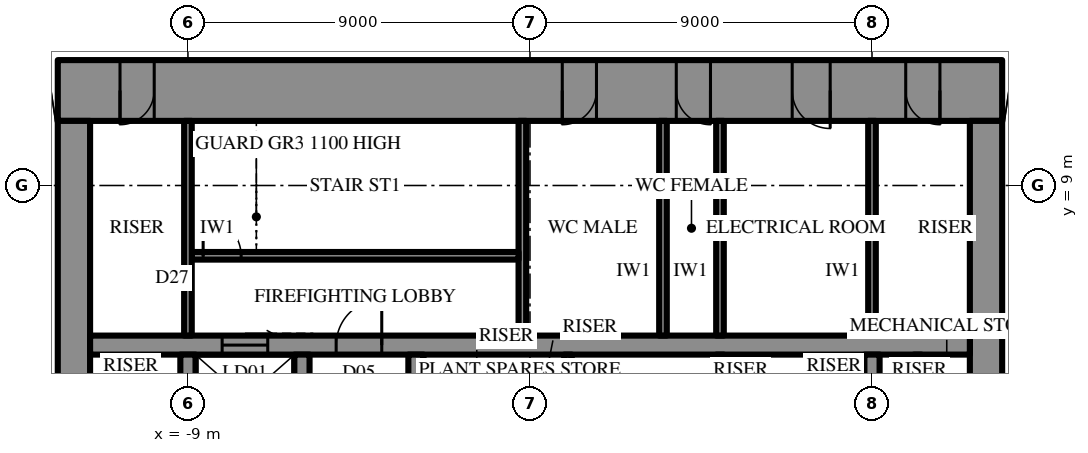
"""IFC4 building model, lengths in metres.
Left out: names, types, materials, properties, quantities, classifications, styles, units other than length and angle.
Written with IfcOpenShell. Run it as: python <this file> out.ifc"""

import sys

from ifc_helpers import new_model, si_unit, direction, frame, frame_2d, origin, place, context, subcontext, project, spatial, rectangle, extrude, element, fill, save


model = new_model("IFC4")
c1 = context("Model", 3, precision=1e-05, world=origin(), true_north=direction((0.0, 1.0)))
c2 = subcontext(c1, "Body", "Model", "MODEL_VIEW")
j1 = project(units=[si_unit("LENGTHUNIT", "METRE"), si_unit("PLANEANGLEUNIT", "RADIAN")], contexts=[c1])
p1 = place(None, origin())
s1 = spatial("IfcSite", under=j1, at=p1, CompositionType="ELEMENT")
p2 = place(p1, origin())
s2 = spatial("IfcBuilding", under=s1, at=p2, CompositionType="ELEMENT")
p3 = place(p2, frame((0.0, 0.0, 402.3)))
s3 = spatial("IfcBuildingStorey", under=s2, at=p3, CompositionType="ELEMENT", Elevation=402.3)
p4 = place(p3, frame((-12.425, 11.5, 0.0), z_axis=(0.0, 0.0, 1.0), x_axis=(1.0, 0.0, 0.0)))
e1 = element("IfcWall", 1, at=p4, inside=s3, PredefinedType="SHEAR", context=c2, shape_type="SweptSolid", body=[
    extrude(rectangle(XDim=24.85, YDim=1.6, at=frame_2d((12.425, 0.0))), origin(), (0.0, 0.0, 1.0), 6.0),
])
p5 = place(p4, frame((13.275, 0.0, 0.0)))
e2 = element("IfcOpeningElement", 2, at=p5, cuts=e1, PredefinedType="OPENING", context=c2, shape_type="SweptSolid", body=[
    extrude(rectangle(XDim=0.9, YDim=2.2, at=frame_2d((0.45, 1.1))), frame((0.0, 0.81, 0.0), z_axis=(0.0, -1.0, 0.0), x_axis=(1.0, 0.0, 0.0)), (0.0, 0.0, 1.0), 1.62),
])
p6 = place(p4, frame((16.275, 0.0, 0.0)))
e3 = element("IfcOpeningElement", 3, at=p6, cuts=e1, PredefinedType="OPENING", context=c2, shape_type="SweptSolid", body=[
    extrude(rectangle(XDim=0.9, YDim=2.2, at=frame_2d((0.45, 1.1))), frame((0.0, 0.81, 0.0), z_axis=(0.0, -1.0, 0.0), x_axis=(1.0, 0.0, 0.0)), (0.0, 0.0, 1.0), 1.62),
])
p7 = place(p4, frame((19.325, 0.0, 0.0)))
e4 = element("IfcOpeningElement", 4, at=p7, cuts=e1, PredefinedType="OPENING", context=c2, shape_type="SweptSolid", body=[
    extrude(rectangle(XDim=1.0, YDim=2.2, at=frame_2d((0.5, 1.1))), frame((0.0, 0.81, 0.0), z_axis=(0.0, -1.0, 0.0), x_axis=(1.0, 0.0, 0.0)), (0.0, 0.0, 1.0), 1.62),
])
p8 = place(p4, frame((1.637, 0.0, 0.0)))
e5 = element("IfcOpeningElement", 5, at=p8, cuts=e1, PredefinedType="OPENING", context=c2, shape_type="SweptSolid", body=[
    extrude(rectangle(XDim=0.9, YDim=2.2, at=frame_2d((0.45, 1.1))), frame((0.0, 0.81, 0.0), z_axis=(0.0, -1.0, 0.0), x_axis=(1.0, 0.0, 0.0)), (0.0, 0.0, 1.0), 1.62),
])
p9 = place(p4, frame((22.312, 0.0, 0.0)))
e6 = element("IfcOpeningElement", 6, at=p9, cuts=e1, PredefinedType="OPENING", context=c2, shape_type="SweptSolid", body=[
    extrude(rectangle(XDim=0.9, YDim=2.2, at=frame_2d((0.45, 1.1))), frame((0.0, 0.81, 0.0), z_axis=(0.0, -1.0, 0.0), x_axis=(1.0, 0.0, 0.0)), (0.0, 0.0, 1.0), 1.62),
])
p10 = place(p3, frame((12.0, -10.7, 0.0), z_axis=(0.0, 0.0, 1.0), x_axis=(0.0, 1.0, 0.0)))
e7 = element("IfcWall", 7, at=p10, inside=s3, PredefinedType="SHEAR", context=c2, shape_type="SweptSolid", body=[
    extrude(rectangle(XDim=21.4, YDim=0.85, at=frame_2d((10.7, 0.0))), origin(), (0.0, 0.0, 1.0), 6.0),
])
p11 = place(p10, frame((9.8, 0.0, 0.0)))
e8 = element("IfcOpeningElement", 8, at=p11, cuts=e7, PredefinedType="OPENING", context=c2, shape_type="SweptSolid", body=[
    extrude(rectangle(XDim=1.8, YDim=2.4, at=frame_2d((0.9, 1.2))), frame((0.0, 0.435, 0.0), z_axis=(0.0, -1.0, 0.0), x_axis=(1.0, 0.0, 0.0)), (0.0, 0.0, 1.0), 0.87),
])
p12 = place(p3, frame((-12.0, 10.7, 0.0), z_axis=(0.0, 0.0, 1.0), x_axis=(0.0, -1.0, 0.0)))
e9 = element("IfcWall", 9, at=p12, inside=s3, PredefinedType="SHEAR", context=c2, shape_type="SweptSolid", body=[
    extrude(rectangle(XDim=21.4, YDim=0.85, at=frame_2d((10.7, 0.0))), origin(), (0.0, 0.0, 1.0), 6.0),
])
p13 = place(p12, frame((9.8, 0.0, 0.0)))
e10 = element("IfcOpeningElement", 10, at=p13, cuts=e9, PredefinedType="OPENING", context=c2, shape_type="SweptSolid", body=[
    extrude(rectangle(XDim=1.8, YDim=2.4, at=frame_2d((0.9, 1.2))), frame((0.0, 0.435, 0.0), z_axis=(0.0, -1.0, 0.0), x_axis=(1.0, 0.0, 0.0)), (0.0, 0.0, 1.0), 0.87),
])
p14 = place(p3, frame((-11.575, 4.8, 0.0), z_axis=(0.0, 0.0, 1.0), x_axis=(1.0, 0.0, 0.0)))
e11 = element("IfcWall", 11, at=p14, inside=s3, PredefinedType="SHEAR", context=c2, shape_type="SweptSolid", body=[
    extrude(rectangle(XDim=23.15, YDim=0.5, at=frame_2d((11.575, 0.0))), origin(), (0.0, 0.0, 1.0), 6.0),
])
p15 = place(p14, frame((6.475, 0.0, 0.0)))
e12 = element("IfcOpeningElement", 12, at=p15, cuts=e11, PredefinedType="OPENING", context=c2, shape_type="SweptSolid", body=[
    extrude(rectangle(XDim=1.2, YDim=2.2, at=frame_2d((0.6, 1.1))), frame((0.0, 0.26, 0.0), z_axis=(0.0, -1.0, 0.0), x_axis=(1.0, 0.0, 0.0)), (0.0, 0.0, 1.0), 0.52),
])
p16 = place(p14, frame((3.475, 0.0, 0.0)))
e13 = element("IfcOpeningElement", 13, at=p16, cuts=e11, PredefinedType="OPENING", context=c2, shape_type="SweptSolid", body=[
    extrude(rectangle(XDim=1.2, YDim=2.2, at=frame_2d((0.6, 1.1))), frame((0.0, 0.26, 0.0), z_axis=(0.0, -1.0, 0.0), x_axis=(1.0, 0.0, 0.0)), (0.0, 0.0, 1.0), 0.52),
])
for number, where, z_axis, x_axis in (
    (14, (-9.0, 2.25, 0.0), (0.0, 0.0, 1.0), (0.0, 1.0, 0.0)),
    (15, (-6.0, 2.25, 0.0), (0.0, 0.0, 1.0), (0.0, 1.0, 0.0)),
    (16, (-3.0, 2.25, 0.0), (0.0, 0.0, 1.0), (0.0, 1.0, 0.0)),
    (17, (9.0, 2.25, 0.0), (0.0, 0.0, 1.0), (0.0, 1.0, 0.0)),
):
    element("IfcWall", number, at=place(p3, frame(where, z_axis=z_axis, x_axis=x_axis)), inside=s3, PredefinedType="SHEAR", context=c2, shape_type="SweptSolid", body=[
        extrude(rectangle(XDim=2.3, YDim=0.4, at=frame_2d((1.15, 0.0))), origin(), (0.0, 0.0, 1.0), 6.0),
    ])
p17 = place(p3, frame((-0.2, 5.05, 0.0), z_axis=(0.0, 0.0, 1.0), x_axis=(0.0, 1.0, 0.0)))
e18 = element("IfcWall", 18, at=p17, inside=s3, PredefinedType="SHEAR", context=c2, shape_type="SweptSolid", body=[
    extrude(rectangle(XDim=5.65, YDim=0.2, at=frame_2d((2.825, 0.0))), origin(), (0.0, 0.0, 1.0), 6.0),
])
p18 = place(p3, frame((-8.9, 7.15, 0.0), z_axis=(0.0, 0.0, 1.0), x_axis=(1.0, 0.0, 0.0)))
e19 = element("IfcWall", 19, at=p18, inside=s3, PredefinedType="SHEAR", context=c2, shape_type="SweptSolid", body=[
    extrude(rectangle(XDim=8.6, YDim=0.2, at=frame_2d((4.3, 0.0))), origin(), (0.0, 0.0, 1.0), 6.0),
])
p19 = place(p18, frame((0.3, 0.0, 0.0)))
e20 = element("IfcOpeningElement", 20, at=p19, cuts=e19, PredefinedType="OPENING", context=c2, shape_type="SweptSolid", body=[
    extrude(rectangle(XDim=1.0, YDim=2.2, at=frame_2d((0.5, 1.1))), frame((0.0, 0.11, 0.0), z_axis=(0.0, -1.0, 0.0), x_axis=(1.0, 0.0, 0.0)), (0.0, 0.0, 1.0), 0.22),
])
for number, where, z_axis, x_axis in (
    (21, (-9.0, 5.05, 0.0), (0.0, 0.0, 1.0), (0.0, 1.0, 0.0)),
    (22, (9.0, 5.05, 0.0), (0.0, 0.0, 1.0), (0.0, 1.0, 0.0)),
    (23, (3.5, 5.05, 0.0), (0.0, 0.0, 1.0), (0.0, 1.0, 0.0)),
    (24, (5.0, 5.05, 0.0), (0.0, 0.0, 1.0), (0.0, 1.0, 0.0)),
):
    element("IfcWall", number, at=place(p3, frame(where, z_axis=z_axis, x_axis=x_axis)), inside=s3, PredefinedType="PARTITIONING", context=c2, shape_type="SweptSolid", body=[
        extrude(rectangle(XDim=5.65, YDim=0.2, at=frame_2d((2.825, 0.0))), origin(), (0.0, 0.0, 1.0), 5.7),
    ])
for number, where, z_axis, x_axis in (
    (25, (1.0, 3.55, 0.0), (0.0, 0.0, 1.0), (0.0, 1.0, 0.0)),
    (26, (5.0, 3.55, 0.0), (0.0, 0.0, 1.0), (0.0, 1.0, 0.0)),
    (27, (10.2, 3.55, 0.0), (0.0, 0.0, 1.0), (0.0, 1.0, 0.0)),
):
    element("IfcWall", number, at=place(p3, frame(where, z_axis=z_axis, x_axis=x_axis)), inside=s3, PredefinedType="PARTITIONING", context=c2, shape_type="SweptSolid", body=[
        extrude(rectangle(XDim=1.0, YDim=0.2, at=frame_2d((0.5, 0.0))), origin(), (0.0, 0.0, 1.0), 5.7),
    ])
p20 = place(p15, origin())
e28 = element("IfcDoor", 28, at=p20, inside=s3, OperationType="SINGLE_SWING_LEFT", PredefinedType="DOOR", context=c2, shape_type="SweptSolid", body=[
    extrude(rectangle(XDim=1.2, YDim=2.2, at=frame_2d((0.6, 1.1))), frame((0.0, 0.025, 0.0), z_axis=(0.0, -1.0, 0.0), x_axis=(1.0, 0.0, 0.0)), (0.0, 0.0, 1.0), 0.05),
])
fill(e12, e28)
p21 = place(p19, origin())
e29 = element("IfcDoor", 29, at=p21, inside=s3, OperationType="SINGLE_SWING_RIGHT", PredefinedType="DOOR", context=c2, shape_type="SweptSolid", body=[
    extrude(rectangle(XDim=1.0, YDim=2.2, at=frame_2d((0.5, 1.1))), frame((0.0, 0.025, 0.0), z_axis=(0.0, -1.0, 0.0), x_axis=(1.0, 0.0, 0.0)), (0.0, 0.0, 1.0), 0.05),
])
fill(e20, e29)
p22 = place(p5, frame((0.9, 0.0, 0.0), z_axis=(0.0, 0.0, 1.0), x_axis=(-1.0, 0.0, 0.0)))
e30 = element("IfcDoor", 30, at=p22, inside=s3, OperationType="SINGLE_SWING_LEFT", PredefinedType="DOOR", context=c2, shape_type="SweptSolid", body=[
    extrude(rectangle(XDim=0.9, YDim=2.2, at=frame_2d((0.45, 1.1))), frame((0.0, 0.025, 0.0), z_axis=(0.0, -1.0, 0.0), x_axis=(1.0, 0.0, 0.0)), (0.0, 0.0, 1.0), 0.05),
])
fill(e2, e30)
p23 = place(p6, frame((0.9, 0.0, 0.0), z_axis=(0.0, 0.0, 1.0), x_axis=(-1.0, 0.0, 0.0)))
e31 = element("IfcDoor", 31, at=p23, inside=s3, OperationType="SINGLE_SWING_RIGHT", PredefinedType="DOOR", context=c2, shape_type="SweptSolid", body=[
    extrude(rectangle(XDim=0.9, YDim=2.2, at=frame_2d((0.45, 1.1))), frame((0.0, 0.025, 0.0), z_axis=(0.0, -1.0, 0.0), x_axis=(1.0, 0.0, 0.0)), (0.0, 0.0, 1.0), 0.05),
])
fill(e3, e31)
p24 = place(p7, frame((1.0, 0.0, 0.0), z_axis=(0.0, 0.0, 1.0), x_axis=(-1.0, 0.0, 0.0)))
e32 = element("IfcDoor", 32, at=p24, inside=s3, OperationType="SINGLE_SWING_RIGHT", PredefinedType="DOOR", context=c2, shape_type="SweptSolid", body=[
    extrude(rectangle(XDim=1.0, YDim=2.2, at=frame_2d((0.5, 1.1))), frame((0.0, 0.025, 0.0), z_axis=(0.0, -1.0, 0.0), x_axis=(1.0, 0.0, 0.0)), (0.0, 0.0, 1.0), 0.05),
])
fill(e4, e32)
p25 = place(p8, frame((0.9, 0.0, 0.0), z_axis=(0.0, 0.0, 1.0), x_axis=(-1.0, 0.0, 0.0)))
e33 = element("IfcDoor", 33, at=p25, inside=s3, OperationType="SINGLE_SWING_LEFT", PredefinedType="DOOR", context=c2, shape_type="SweptSolid", body=[
    extrude(rectangle(XDim=0.9, YDim=2.2, at=frame_2d((0.45, 1.1))), frame((0.0, 0.025, 0.0), z_axis=(0.0, -1.0, 0.0), x_axis=(1.0, 0.0, 0.0)), (0.0, 0.0, 1.0), 0.05),
])
fill(e5, e33)
p26 = place(p9, frame((0.9, 0.0, 0.0), z_axis=(0.0, 0.0, 1.0), x_axis=(-1.0, 0.0, 0.0)))
e34 = element("IfcDoor", 34, at=p26, inside=s3, OperationType="SINGLE_SWING_RIGHT", PredefinedType="DOOR", context=c2, shape_type="SweptSolid", body=[
    extrude(rectangle(XDim=0.9, YDim=2.2, at=frame_2d((0.45, 1.1))), frame((0.0, 0.025, 0.0), z_axis=(0.0, -1.0, 0.0), x_axis=(1.0, 0.0, 0.0)), (0.0, 0.0, 1.0), 0.05),
])
fill(e6, e34)
p27 = place(p16, origin())
e35 = element("IfcDoor", 35, at=p27, inside=s3, OperationType="SLIDING_TO_LEFT", PredefinedType="DOOR", context=c2, shape_type="SweptSolid", body=[
    extrude(rectangle(XDim=1.2, YDim=2.2, at=frame_2d((0.6, 1.1))), frame((0.0, 0.025, 0.0), z_axis=(0.0, -1.0, 0.0), x_axis=(1.0, 0.0, 0.0)), (0.0, 0.0, 1.0), 0.05),
])
fill(e13, e35)
save(model, sys.argv[1])
